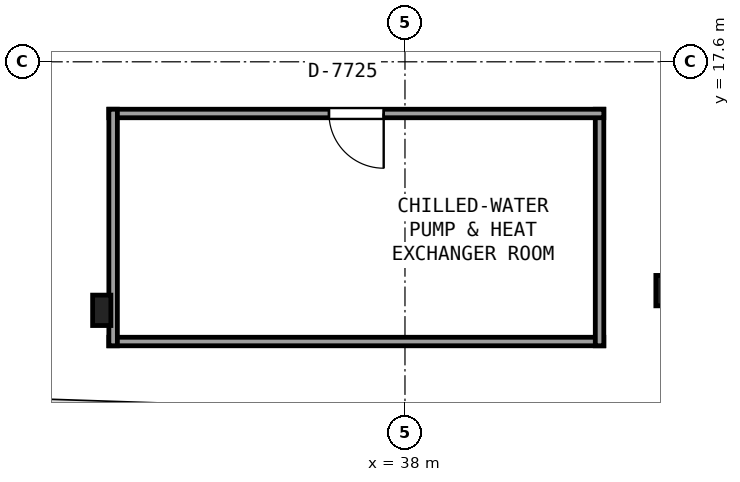
"""IFC4 building model, lengths in metres.
Left out: names, types, materials, properties, quantities, classifications, styles, units other than length and angle.
Written with IfcOpenShell. Run it as: python <this file> out.ifc"""

import sys

from ifc_helpers import new_model, si_unit, direction, frame, frame_2d, origin, origin_2d, place, context, subcontext, project, spatial, rectangle, i_section, extrude, element, fill, save


model = new_model("IFC4")
c1 = context("Model", 3, precision=1e-05, world=origin(), true_north=direction((0.0, 1.0)))
c2 = subcontext(c1, "Body", "Model", "MODEL_VIEW")
j1 = project(units=[si_unit("LENGTHUNIT", "METRE"), si_unit("PLANEANGLEUNIT", "RADIAN")], contexts=[c1])
p1 = place(None, origin())
s1 = spatial("IfcSite", under=j1, at=p1, CompositionType="ELEMENT")
p2 = place(p1, origin())
s2 = spatial("IfcBuilding", under=s1, at=p2, CompositionType="ELEMENT")
p3 = place(p2, frame((0.0, 0.0, 286.7)))
s3 = spatial("IfcBuildingStorey", under=s2, at=p3, CompositionType="ELEMENT", Elevation=286.7)
for number, where, z_axis, x_axis in (
    (1, (33.013, 13.513, 0.0), (0.0, 0.0, 1.0), (1.0, 0.0, 0.0)),
    (2, (42.276, 13.837, 0.0), (0.0, 0.0, 1.0), (1.0, 0.0, 0.0)),
):
    element("IfcColumn", number, at=place(p3, frame(where, z_axis=z_axis, x_axis=x_axis)), inside=s3, PredefinedType="COLUMN", context=c2, shape_type="SweptSolid", body=[
        extrude(i_section(OverallWidth=0.3, OverallDepth=0.5, WebThickness=0.015, FlangeThickness=0.028, at=origin_2d()), origin(), (0.0, 0.0, 1.0), 2.78),
    ])
p4 = place(p3, frame((33.13, 13.0, 0.0), z_axis=(0.0, 0.0, 1.0), x_axis=(1.0, 0.0, 0.0)))
e3 = element("IfcWall", 3, at=p4, inside=s3, PredefinedType="PARTITIONING", context=c2, shape_type="SweptSolid", body=[
    extrude(rectangle(XDim=8.14, YDim=0.14, at=frame_2d((4.07, 0.0))), origin(), (0.0, 0.0, 1.0), 2.78),
])
p5 = place(p3, frame((41.2, 12.93, 0.0), z_axis=(0.0, 0.0, 1.0), x_axis=(0.0, 1.0, 0.0)))
e4 = element("IfcWall", 4, at=p5, inside=s3, PredefinedType="PARTITIONING", context=c2, shape_type="SweptSolid", body=[
    extrude(rectangle(XDim=3.89, YDim=0.14, at=frame_2d((1.945, 0.0))), origin(), (0.0, 0.0, 1.0), 2.229),
])
p6 = place(p3, frame((41.27, 16.75, 0.0), z_axis=(0.0, 0.0, 1.0), x_axis=(-1.0, 0.0, 0.0)))
e5 = element("IfcWall", 5, at=p6, inside=s3, PredefinedType="PARTITIONING", context=c2, shape_type="SweptSolid", body=[
    extrude(rectangle(XDim=8.14, YDim=0.14, at=frame_2d((4.07, 0.0))), origin(), (0.0, 0.0, 1.0), 2.229),
])
p7 = place(p6, frame((3.62, 0.0, 0.0)))
e6 = element("IfcOpeningElement", 6, at=p7, cuts=e5, PredefinedType="OPENING", context=c2, shape_type="SweptSolid", body=[
    extrude(rectangle(XDim=0.9, YDim=2.0, at=frame_2d((0.45, 1.0))), frame((0.0, 0.08, 0.0), z_axis=(0.0, -1.0, 0.0), x_axis=(1.0, 0.0, 0.0)), (0.0, 0.0, 1.0), 0.16),
])
p8 = place(p3, frame((33.2, 16.82, 0.0), z_axis=(0.0, 0.0, 1.0), x_axis=(0.0, -1.0, 0.0)))
e7 = element("IfcWall", 7, at=p8, inside=s3, PredefinedType="PARTITIONING", context=c2, shape_type="SweptSolid", body=[
    extrude(rectangle(XDim=3.89, YDim=0.14, at=frame_2d((1.945, 0.0))), origin(), (0.0, 0.0, 1.0), 2.229),
])
p9 = place(p7, origin())
e8 = element("IfcDoor", 8, at=p9, inside=s3, OperationType="SINGLE_SWING_LEFT", PredefinedType="DOOR", context=c2, shape_type="SweptSolid", body=[
    extrude(rectangle(XDim=0.9, YDim=2.0, at=frame_2d((0.45, 1.0))), frame((0.0, 0.025, 0.0), z_axis=(0.0, -1.0, 0.0), x_axis=(1.0, 0.0, 0.0)), (0.0, 0.0, 1.0), 0.05),
])
fill(e6, e8)
save(model, sys.argv[1])
